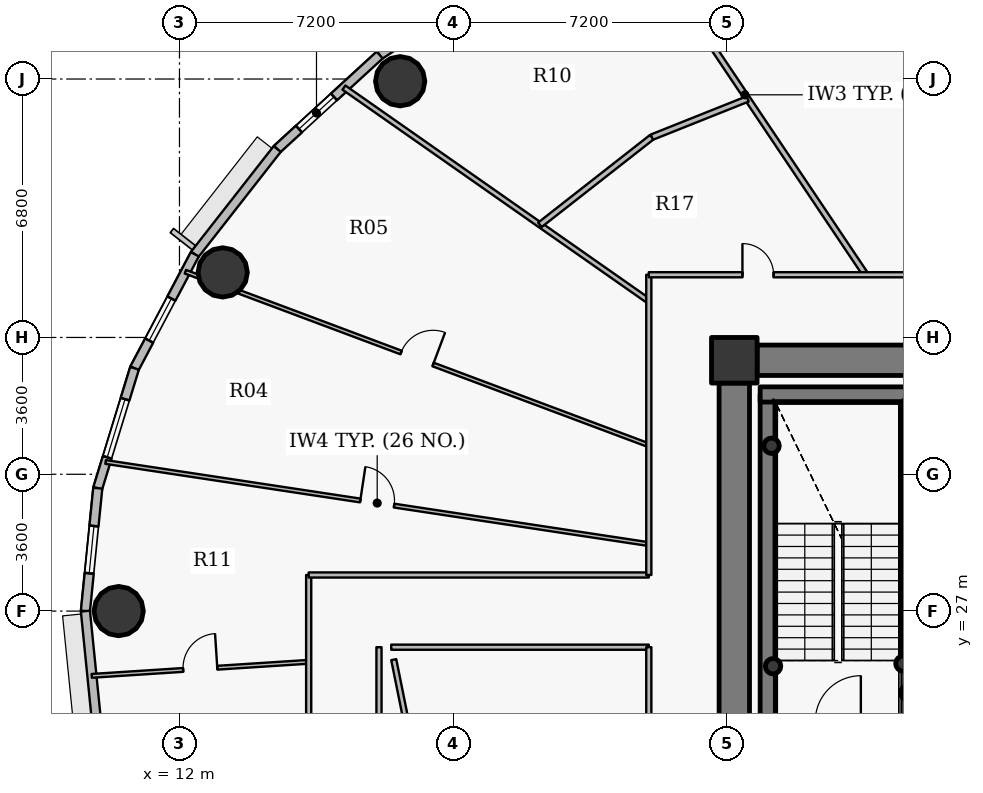
"""IFC4 building model, lengths in metres.
Left out: names, types, materials, properties, quantities, classifications, styles, units other than length and angle.
Written with IfcOpenShell. Run it as: python <this file> out.ifc"""

import sys

from ifc_helpers import new_model, si_unit, direction, frame, frame_2d, origin, origin_2d, place, context, subcontext, project, spatial, rectangle, hollow_circle, extrude, source, transform, mapped, element, fill, save


model = new_model("IFC4")
c1 = context("Model", 3, precision=1e-05, world=origin(), true_north=direction((0.0, 1.0)))
c2 = subcontext(c1, "Body", "Model", "MODEL_VIEW")
j1 = project(units=[si_unit("LENGTHUNIT", "METRE"), si_unit("PLANEANGLEUNIT", "RADIAN")], contexts=[c1])
p1 = place(None, origin())
s1 = spatial("IfcSite", under=j1, at=p1, CompositionType="ELEMENT")
p2 = place(p1, origin())
s2 = spatial("IfcBuilding", under=s1, at=p2, CompositionType="ELEMENT")
p3 = place(p2, frame((0.0, 0.0, 167.4)))
s3 = spatial("IfcBuildingStorey", under=s2, at=p3, CompositionType="ELEMENT", Elevation=167.4)
p4 = place(p3, frame((26.6, 33.6, 0.0), z_axis=(0.0, 0.0, 1.0), x_axis=(1.0, 0.0, 0.0)))
e1 = element("IfcColumn", 1, at=p4, inside=s3, PredefinedType="COLUMN", context=c2, shape_type="SweptSolid", body=[
    extrude(rectangle(XDim=1.2, YDim=1.2, at=origin_2d()), origin(), (0.0, 0.0, 1.0), 3.75),
])
p5 = place(p3, frame((27.48, 24.1, 0.0), z_axis=(0.0, 0.0, 1.0), x_axis=(0.0, 1.0, 0.0)))
e2 = element("IfcWall", 2, at=p5, inside=s3, PredefinedType="SHEAR", context=c2, shape_type="SweptSolid", body=[
    extrude(rectangle(XDim=8.6, YDim=0.4, at=frame_2d((4.3, 0.0))), origin(), (0.0, 0.0, 1.0), 3.75),
])
p6 = place(p3, frame((31.18, 27.8, 0.0), z_axis=(0.0, 0.0, 1.0), x_axis=(0.0, 1.0, 0.0)))
e3 = element("IfcWall", 3, at=p6, inside=s3, PredefinedType="SHEAR", context=c2, shape_type="SweptSolid", body=[
    extrude(rectangle(XDim=4.9, YDim=0.4, at=frame_2d((2.45, 0.0))), origin(), (0.0, 0.0, 1.0), 3.75),
])
p7 = place(p3, frame((27.28, 32.7, 0.0), z_axis=(0.0, 0.0, 1.0), x_axis=(1.0, 0.0, 0.0)))
e4 = element("IfcWall", 4, at=p7, inside=s3, PredefinedType="SHEAR", context=c2, shape_type="SweptSolid", body=[
    extrude(rectangle(XDim=4.1, YDim=0.4, at=frame_2d((2.05, 0.0))), origin(), (0.0, 0.0, 1.0), 3.75),
])
for number, where, z_axis, x_axis in (
    (5, (27.58, 31.35, 0.0), (0.0, 0.0, 1.0), (1.0, 0.0, 0.0)),
    (6, (31.05, 25.62, 0.0), (0.0, 0.0, 1.0), (1.0, 0.0, 0.0)),
    (7, (31.18, 24.85, 0.0), (0.0, 0.0, 1.0), (1.0, 0.0, 0.0)),
    (8, (27.62, 25.55, 0.0), (0.0, 0.0, 1.0), (1.0, 0.0, 0.0)),
):
    element("IfcColumn", number, at=place(p3, frame(where, z_axis=z_axis, x_axis=x_axis)), inside=s3, PredefinedType="COLUMN", context=c2, shape_type="SweptSolid", body=[
        extrude(hollow_circle(Radius=0.203, WallThickness=0.016, at=origin_2d()), origin(), (0.0, 0.0, 1.0), 3.75),
    ])
p8 = place(p3, frame((27.2, 33.6, 0.0), z_axis=(0.0, 0.0, 1.0), x_axis=(1.0, 0.0, 0.0)))
e9 = element("IfcWall", 9, at=p8, inside=s3, PredefinedType="SHEAR", context=c2, shape_type="SweptSolid", body=[
    extrude(rectangle(XDim=17.6, YDim=0.8, at=frame_2d((8.8, 0.0))), origin(), (0.0, 0.0, 1.0), 2.95),
])
p9 = place(p8, frame((13.45, 0.0, 0.0)))
e10 = element("IfcOpeningElement", 10, at=p9, cuts=e9, PredefinedType="OPENING", context=c2, shape_type="SweptSolid", body=[
    extrude(rectangle(XDim=1.15, YDim=2.15, at=origin_2d()), frame((0.575, 0.41, 1.075), z_axis=(0.0, -1.0, 0.0), x_axis=(1.0, 0.0, 0.0)), (0.0, 0.0, 1.0), 0.82),
])
p10 = place(p3, frame((26.6, 21.0, 0.0), z_axis=(0.0, 0.0, 1.0), x_axis=(0.0, 1.0, 0.0)))
e11 = element("IfcWall", 11, at=p10, inside=s3, PredefinedType="SHEAR", context=c2, shape_type="SweptSolid", body=[
    extrude(rectangle(XDim=12.0, YDim=0.8, at=frame_2d((6.0, 0.0))), origin(), (0.0, 0.0, 1.0), 2.95),
])
p11 = place(p10, frame((1.061, 0.0, 0.0)))
e12 = element("IfcOpeningElement", 12, at=p11, cuts=e11, PredefinedType="OPENING", context=c2, shape_type="SweptSolid", body=[
    extrude(rectangle(XDim=1.15, YDim=2.15, at=origin_2d()), frame((0.575, 0.41, 1.075), z_axis=(0.0, -1.0, 0.0), x_axis=(1.0, 0.0, 0.0)), (0.0, 0.0, 1.0), 0.82),
])
p12 = place(p3, frame((31.18, 25.55, 0.0), z_axis=(0.0, 0.0, 1.0), x_axis=(0.0, 1.0, 0.0)))
e13 = element("IfcWall", 13, at=p12, inside=s3, PredefinedType="SHEAR", context=c2, shape_type="SweptSolid", body=[
    extrude(rectangle(XDim=2.25, YDim=0.4, at=frame_2d((1.125, 0.0))), origin(), (0.0, 0.0, 1.0), 3.1),
])
for number, where, z_axis, x_axis in (
    (14, (17.808, 40.942, 0.0), (0.0, 0.0, 1.0), (1.0, 0.0, 0.0)),
    (15, (13.137, 35.911, 0.0), (0.0, 0.0, 1.0), (1.0, 0.0, 0.0)),
    (16, (10.4, 27.0, 0.0), (0.0, 0.0, 1.0), (1.0, 0.0, 0.0)),
):
    element("IfcColumn", number, at=place(p3, frame(where, z_axis=z_axis, x_axis=x_axis)), inside=s3, PredefinedType="COLUMN", context=c2, shape_type="SweptSolid", body=[
        extrude(hollow_circle(Radius=0.65, WallThickness=0.04, at=origin_2d()), origin(), (0.0, 0.0, 1.0), 3.75),
    ])
p13 = place(p3, frame((17.268, 41.631, 0.0), z_axis=(0.0, 0.0, 1.0), x_axis=(0.831228998277, 0.555930168657, 0.0)))
e17 = element("IfcWall", 17, at=p13, inside=s3, PredefinedType="SOLIDWALL", context=c2, shape_type="SweptSolid", body=[
    extrude(rectangle(XDim=3.8, YDim=0.24, at=frame_2d((1.9, 0.0))), origin(), (0.0, 0.0, 1.0), 3.5),
])
p14 = place(p3, frame((14.572, 39.158, 0.0), z_axis=(0.0, 0.0, 1.0), x_axis=(0.737076565834, 0.675809245349, 0.0)))
e18 = element("IfcWall", 18, at=p14, inside=s3, PredefinedType="SOLIDWALL", context=c2, shape_type="SweptSolid", body=[
    extrude(rectangle(XDim=3.658, YDim=0.24, at=frame_2d((1.829, 0.0))), origin(), (0.0, 0.0, 1.0), 3.5),
])
p15 = place(p14, frame((0.778, 0.0, 0.9)))
e19 = element("IfcOpeningElement", 19, at=p15, cuts=e18, PredefinedType="OPENING", context=c2, shape_type="SweptSolid", body=[
    extrude(rectangle(XDim=1.25, YDim=1.65, at=origin_2d()), frame((0.625, 0.13, 0.825), z_axis=(0.0, -1.0, 0.0), x_axis=(1.0, 0.0, 0.0)), (0.0, 0.0, 1.0), 0.26),
])
p16 = place(p3, frame((12.404, 36.388, 0.0), z_axis=(0.0, 0.0, 1.0), x_axis=(0.616287674549, 0.787521112224, 0.0)))
e20 = element("IfcWall", 20, at=p16, inside=s3, PredefinedType="SOLIDWALL", context=c2, shape_type="SweptSolid", body=[
    extrude(rectangle(XDim=3.517, YDim=0.24, at=frame_2d((1.759, 0.0))), origin(), (0.0, 0.0, 1.0), 3.5),
])
p17 = place(p3, frame((10.817, 33.389, 0.0), z_axis=(0.0, 0.0, 1.0), x_axis=(0.467586874938, 0.88394712194, 0.0)))
e21 = element("IfcWall", 21, at=p17, inside=s3, PredefinedType="SOLIDWALL", context=c2, shape_type="SweptSolid", body=[
    extrude(rectangle(XDim=3.393, YDim=0.24, at=frame_2d((1.697, 0.0))), origin(), (0.0, 0.0, 1.0), 3.5),
])
p18 = place(p17, frame((0.825, 0.0, 0.9)))
e22 = element("IfcOpeningElement", 22, at=p18, cuts=e21, PredefinedType="OPENING", context=c2, shape_type="SweptSolid", body=[
    extrude(rectangle(XDim=1.25, YDim=1.65, at=origin_2d()), frame((0.625, 0.13, 0.825), z_axis=(0.0, -1.0, 0.0), x_axis=(1.0, 0.0, 0.0)), (0.0, 0.0, 1.0), 0.26),
])
p19 = place(p3, frame((9.85, 30.234, 0.0), z_axis=(0.0, 0.0, 1.0), x_axis=(0.293097995113, 0.956082405058, 0.0)))
e23 = element("IfcWall", 23, at=p19, inside=s3, PredefinedType="SOLIDWALL", context=c2, shape_type="SweptSolid", body=[
    extrude(rectangle(XDim=3.3, YDim=0.24, at=frame_2d((1.65, 0.0))), origin(), (0.0, 0.0, 1.0), 3.5),
])
p20 = place(p19, frame((0.85, 0.0, 0.9)))
e24 = element("IfcOpeningElement", 24, at=p20, cuts=e23, PredefinedType="OPENING", context=c2, shape_type="SweptSolid", body=[
    extrude(rectangle(XDim=1.6, YDim=1.75, at=origin_2d()), frame((0.8, 0.13, 0.875), z_axis=(0.0, -1.0, 0.0), x_axis=(1.0, 0.0, 0.0)), (0.0, 0.0, 1.0), 0.26),
])
p21 = place(p3, frame((9.525, 27.0, 0.0), z_axis=(0.0, 0.0, 1.0), x_axis=(0.100061534614, 0.994981250723, 0.0)))
e25 = element("IfcWall", 25, at=p21, inside=s3, PredefinedType="SOLIDWALL", context=c2, shape_type="SweptSolid", body=[
    extrude(rectangle(XDim=3.25, YDim=0.24, at=frame_2d((1.625, 0.0))), origin(), (0.0, 0.0, 1.0), 3.5),
])
p22 = place(p21, frame((1.0, 0.0, 0.9)))
e26 = element("IfcOpeningElement", 26, at=p22, cuts=e25, PredefinedType="OPENING", context=c2, shape_type="SweptSolid", body=[
    extrude(rectangle(XDim=1.25, YDim=1.65, at=origin_2d()), frame((0.625, 0.13, 0.825), z_axis=(0.0, -1.0, 0.0), x_axis=(1.0, 0.0, 0.0)), (0.0, 0.0, 1.0), 0.26),
])
p23 = place(p3, frame((9.85, 23.766, 0.0), z_axis=(0.0, 0.0, 1.0), x_axis=(-0.100061534614, 0.994981250723, 0.0)))
e27 = element("IfcWall", 27, at=p23, inside=s3, PredefinedType="SOLIDWALL", context=c2, shape_type="SweptSolid", body=[
    extrude(rectangle(XDim=3.25, YDim=0.24, at=frame_2d((1.625, 0.0))), origin(), (0.0, 0.0, 1.0), 3.5),
])
p24 = place(p3, frame((9.691, 25.296, 0.0), z_axis=(0.0, 0.0, 1.0), x_axis=(0.99791042292, 0.064612598054, 0.0)))
e28 = element("IfcWall", 28, at=p24, inside=s3, PredefinedType="PARTITIONING", context=c2, shape_type="SweptSolid", body=[
    extrude(rectangle(XDim=5.721, YDim=0.1, at=frame_2d((2.86, 0.0))), origin(), (0.0, 0.0, 1.0), 2.935),
])
p25 = place(p24, frame((2.41, 0.0, 0.0)))
e29 = element("IfcOpeningElement", 29, at=p25, cuts=e28, PredefinedType="OPENING", context=c2, shape_type="SweptSolid", body=[
    extrude(rectangle(XDim=0.9, YDim=2.1, at=origin_2d()), frame((0.45, 0.06, 1.05), z_axis=(0.0, -1.0, 0.0), x_axis=(1.0, 0.0, 0.0)), (0.0, 0.0, 1.0), 0.12),
])
p26 = place(p3, frame((10.056, 30.924, 0.0), z_axis=(0.0, 0.0, 1.0), x_axis=(0.988757382987, -0.149528718277, 0.0)))
e30 = element("IfcWall", 30, at=p26, inside=s3, PredefinedType="PARTITIONING", context=c2, shape_type="SweptSolid", body=[
    extrude(rectangle(XDim=14.456, YDim=0.1, at=frame_2d((7.228, 0.0))), origin(), (0.0, 0.0, 1.0), 2.935),
])
p27 = place(p26, frame((6.778, 0.0, 0.0)))
e31 = element("IfcOpeningElement", 31, at=p27, cuts=e30, PredefinedType="OPENING", context=c2, shape_type="SweptSolid", body=[
    extrude(rectangle(XDim=0.9, YDim=2.1, at=origin_2d()), frame((0.45, 0.06, 1.05), z_axis=(0.0, -1.0, 0.0), x_axis=(1.0, 0.0, 0.0)), (0.0, 0.0, 1.0), 0.12),
])
p28 = place(p3, frame((12.156, 35.93, 0.0), z_axis=(0.0, 0.0, 1.0), x_axis=(0.936480111121, -0.350720688689, 0.0)))
e32 = element("IfcWall", 32, at=p28, inside=s3, PredefinedType="PARTITIONING", context=c2, shape_type="SweptSolid", body=[
    extrude(rectangle(XDim=13.021, YDim=0.1, at=frame_2d((6.511, 0.0))), origin(), (0.0, 0.0, 1.0), 2.935),
])
p29 = place(p28, frame((6.061, 0.0, 0.0)))
e33 = element("IfcOpeningElement", 33, at=p29, cuts=e32, PredefinedType="OPENING", context=c2, shape_type="SweptSolid", body=[
    extrude(rectangle(XDim=0.9, YDim=2.1, at=origin_2d()), frame((0.45, 0.06, 1.05), z_axis=(0.0, -1.0, 0.0), x_axis=(1.0, 0.0, 0.0)), (0.0, 0.0, 1.0), 0.12),
])
p30 = place(p3, frame((15.4, 23.146, 0.0), z_axis=(0.0, 0.0, 1.0), x_axis=(0.0, 1.0, 0.0)))
e34 = element("IfcWall", 34, at=p30, inside=s3, PredefinedType="PARTITIONING", context=c2, shape_type="SweptSolid", body=[
    extrude(rectangle(XDim=4.804, YDim=0.135, at=frame_2d((2.402, 0.0))), origin(), (0.0, 0.0, 1.0), 2.935),
])
p31 = place(p3, frame((15.4, 27.95, 0.0), z_axis=(0.0, 0.0, 1.0), x_axis=(1.0, 0.0, 0.0)))
e35 = element("IfcWall", 35, at=p31, inside=s3, PredefinedType="PARTITIONING", context=c2, shape_type="SweptSolid", body=[
    extrude(rectangle(XDim=8.95, YDim=0.135, at=frame_2d((4.475, 0.0))), origin(), (0.0, 0.0, 1.0), 3.5),
])
p32 = place(p3, frame((16.327, 40.775, 0.0), z_axis=(0.0, 0.0, 1.0), x_axis=(0.819149932575, -0.573579452179, 0.0)))
e36 = element("IfcWall", 36, at=p32, inside=s3, PredefinedType="PARTITIONING", context=c2, shape_type="SweptSolid", body=[
    extrude(rectangle(XDim=9.794, YDim=0.135, at=frame_2d((4.897, 0.0))), origin(), (0.0, 0.0, 1.0), 2.935),
])
p33 = place(p3, frame((17.572, 26.05, 0.0), z_axis=(0.0, 0.0, 1.0), x_axis=(1.0, 0.0, 0.0)))
e37 = element("IfcWall", 37, at=p33, inside=s3, PredefinedType="PARTITIONING", context=c2, shape_type="SweptSolid", body=[
    extrude(rectangle(XDim=6.778, YDim=0.135, at=frame_2d((3.389, 0.0))), origin(), (0.0, 0.0, 1.0), 3.5),
])
p34 = place(p3, frame((21.485, 37.164, 0.0), z_axis=(0.0, 0.0, 1.0), x_axis=(0.787295634213, 0.616575692311, 0.0)))
e38 = element("IfcWall", 38, at=p34, inside=s3, PredefinedType="PARTITIONING", context=c2, shape_type="SweptSolid", body=[
    extrude(rectangle(XDim=3.741, YDim=0.15, at=frame_2d((1.871, 0.0))), origin(), (0.0, 0.0, 1.0), 2.935),
])
p35 = place(p3, frame((23.699, 45.319, 0.0), z_axis=(0.0, 0.0, 1.0), x_axis=(0.557458426319, -0.830204856, 0.0)))
e39 = element("IfcWall", 39, at=p35, inside=s3, PredefinedType="PARTITIONING", context=c2, shape_type="SweptSolid", body=[
    extrude(rectangle(XDim=11.406, YDim=0.15, at=frame_2d((5.703, 0.0))), origin(), (0.0, 0.0, 1.0), 2.935),
])
p36 = place(p35, frame((2.412, 0.0, 0.0)))
e40 = element("IfcOpeningElement", 40, at=p36, cuts=e39, PredefinedType="OPENING", context=c2, shape_type="SweptSolid", body=[
    extrude(rectangle(XDim=1.05, YDim=2.15, at=origin_2d()), frame((0.525, 0.085, 1.075), z_axis=(0.0, -1.0, 0.0), x_axis=(1.0, 0.0, 0.0)), (0.0, 0.0, 1.0), 0.17),
])
for number, where, z_axis, x_axis in (
    (41, (24.35, 18.15, 0.0), (0.0, 0.0, 1.0), (0.0, 1.0, 0.0)),
    (42, (24.35, 27.95, 0.0), (0.0, 0.0, 1.0), (0.0, 1.0, 0.0)),
):
    element("IfcWall", number, at=place(p3, frame(where, z_axis=z_axis, x_axis=x_axis)), inside=s3, PredefinedType="PARTITIONING", context=c2, shape_type="SweptSolid", body=[
        extrude(rectangle(XDim=7.9, YDim=0.135, at=frame_2d((3.95, 0.0))), origin(), (0.0, 0.0, 1.0), 2.935),
    ])
p37 = place(p3, frame((24.35, 35.85, 0.0), z_axis=(0.0, 0.0, 1.0), x_axis=(1.0, 0.0, 0.0)))
e43 = element("IfcWall", 43, at=p37, inside=s3, PredefinedType="PARTITIONING", context=c2, shape_type="SweptSolid", body=[
    extrude(rectangle(XDim=19.343, YDim=0.135, at=frame_2d((9.671, 0.0))), origin(), (0.0, 0.0, 1.0), 2.935),
])
p38 = place(p37, frame((11.98, 0.0, 0.0)))
e44 = element("IfcOpeningElement", 44, at=p38, cuts=e43, PredefinedType="OPENING", context=c2, shape_type="SweptSolid", body=[
    extrude(rectangle(XDim=1.05, YDim=2.15, at=origin_2d()), frame((0.525, 0.078, 1.075), z_axis=(0.0, -1.0, 0.0), x_axis=(1.0, 0.0, 0.0)), (0.0, 0.0, 1.0), 0.155),
])
p39 = place(p37, frame((2.464, 0.0, 0.0)))
e45 = element("IfcOpeningElement", 45, at=p39, cuts=e43, PredefinedType="OPENING", context=c2, shape_type="SweptSolid", body=[
    extrude(rectangle(XDim=0.82, YDim=2.1, at=origin_2d()), frame((0.41, 0.078, 1.05), z_axis=(0.0, -1.0, 0.0), x_axis=(1.0, 0.0, 0.0)), (0.0, 0.0, 1.0), 0.155),
])
p40 = place(p3, frame((24.43, 39.47, 0.0), z_axis=(0.0, 0.0, 1.0), x_axis=(0.928811262565, 0.370553152103, 0.0)))
e46 = element("IfcWall", 46, at=p40, inside=s3, PredefinedType="PARTITIONING", context=c2, shape_type="SweptSolid", body=[
    extrude(rectangle(XDim=2.715, YDim=0.15, at=frame_2d((1.357, 0.0))), origin(), (0.0, 0.0, 1.0), 3.5),
])
p41 = place(p3, frame((31.1, 24.1, 0.0), z_axis=(0.0, 0.0, 1.0), x_axis=(0.0, 1.0, 0.0)))
e47 = element("IfcWall", 47, at=p41, inside=s3, PredefinedType="PARTITIONING", context=c2, shape_type="SweptSolid", body=[
    extrude(rectangle(XDim=1.44, YDim=0.2, at=frame_2d((0.72, 0.0))), origin(), (0.0, 0.0, 1.0), 3.5),
])
p42 = place(p3, frame((17.25, 26.05, 0.0), z_axis=(0.0, 0.0, 1.0), x_axis=(0.0, -1.0, 0.0)))
e48 = element("IfcWall", 48, at=p42, inside=s3, PredefinedType="PARTITIONING", context=c2, shape_type="SweptSolid", body=[
    extrude(rectangle(XDim=5.06, YDim=0.135, at=frame_2d((2.53, 0.0))), origin(), (0.0, 0.0, 1.0), 2.935),
])
p43 = place(p3, frame((27.19, 34.0, 0.0), z_axis=(0.0, 0.0, 1.0), x_axis=(-1.0, 0.0, 0.0)))
e49 = element("IfcWall", 49, at=p43, inside=s3, PredefinedType="PARTITIONING", context=c2, shape_type="SweptSolid", body=[
    extrude(rectangle(XDim=0.99, YDim=0.135, at=frame_2d((0.495, 0.0))), origin(), (0.0, 0.0, 1.0), 2.935),
])
p44 = place(p3, frame((26.2, 33.692, 0.0), z_axis=(0.0, 0.0, 1.0), x_axis=(0.0, -1.0, 0.0)))
e50 = element("IfcWall", 50, at=p44, inside=s3, PredefinedType="PARTITIONING", context=c2, shape_type="SweptSolid", body=[
    extrude(rectangle(XDim=0.682, YDim=0.135, at=frame_2d((0.341, 0.0))), origin(), (0.0, 0.0, 1.0), 3.5),
])
p45 = place(p3, frame((18.291, 22.494, 0.0), z_axis=(0.0, 0.0, 1.0), x_axis=(-0.198211153628, 0.980159343463, 0.0)))
e51 = element("IfcWall", 51, at=p45, inside=s3, PredefinedType="PARTITIONING", context=c2, shape_type="SweptSolid", body=[
    extrude(rectangle(XDim=3.294, YDim=0.135, at=frame_2d((1.647, 0.0))), origin(), (0.0, 0.0, 1.0), 2.935),
])
m1 = source(origin(), c2, "Body", "SweptSolid", [
    extrude(rectangle(XDim=1.25, YDim=1.65, at=origin_2d()), frame((0.625, 0.03, 0.825), z_axis=(0.0, -1.0, 0.0), x_axis=(1.0, 0.0, 0.0)), (0.0, 0.0, 1.0), 0.06),
])
p46 = place(p15, origin())
e52 = element("IfcWindow", 52, at=p46, inside=s3, PartitioningType="SINGLE_PANEL", PredefinedType="WINDOW", context=c2, shape_type="MappedRepresentation", body=[
    mapped(m1, transform((0.0, 0.0, 0.0), x_axis=(1.0, 0.0, 0.0), y_axis=(0.0, 1.0, 0.0), z_axis=(0.0, 0.0, 1.0), scale=1.0)),
])
fill(e19, e52)
p47 = place(p18, origin())
e53 = element("IfcWindow", 53, at=p47, inside=s3, PartitioningType="SINGLE_PANEL", PredefinedType="WINDOW", context=c2, shape_type="MappedRepresentation", body=[
    mapped(m1, transform((0.0, 0.0, 0.0), x_axis=(1.0, 0.0, 0.0), y_axis=(0.0, 1.0, 0.0), z_axis=(0.0, 0.0, 1.0), scale=1.0)),
])
fill(e22, e53)
m2 = source(origin(), c2, "Body", "SweptSolid", [
    extrude(rectangle(XDim=1.6, YDim=1.75, at=origin_2d()), frame((0.8, 0.03, 0.875), z_axis=(0.0, -1.0, 0.0), x_axis=(1.0, 0.0, 0.0)), (0.0, 0.0, 1.0), 0.06),
])
p48 = place(p20, origin())
e54 = element("IfcWindow", 54, at=p48, inside=s3, PartitioningType="DOUBLE_PANEL_VERTICAL", PredefinedType="WINDOW", context=c2, shape_type="MappedRepresentation", body=[
    mapped(m2, transform((0.0, 0.0, 0.0), x_axis=(1.0, 0.0, 0.0), y_axis=(0.0, 1.0, 0.0), z_axis=(0.0, 0.0, 1.0), scale=1.0)),
])
fill(e24, e54)
p49 = place(p22, origin())
e55 = element("IfcWindow", 55, at=p49, inside=s3, PartitioningType="SINGLE_PANEL", PredefinedType="WINDOW", context=c2, shape_type="MappedRepresentation", body=[
    mapped(m1, transform((0.0, 0.0, 0.0), x_axis=(1.0, 0.0, 0.0), y_axis=(0.0, 1.0, 0.0), z_axis=(0.0, 0.0, 1.0), scale=1.0)),
])
fill(e26, e55)
m3 = source(origin(), c2, "Body", "SweptSolid", [
    extrude(rectangle(XDim=0.9, YDim=2.1, at=origin_2d()), frame((0.45, 0.025, 1.05), z_axis=(0.0, -1.0, 0.0), x_axis=(1.0, 0.0, 0.0)), (0.0, 0.0, 1.0), 0.05),
])
p50 = place(p25, origin())
e56 = element("IfcDoor", 56, at=p50, inside=s3, OperationType="SINGLE_SWING_RIGHT", PredefinedType="DOOR", context=c2, shape_type="MappedRepresentation", body=[
    mapped(m3, transform((0.0, 0.0, 0.0), x_axis=(1.0, 0.0, 0.0), y_axis=(0.0, 1.0, 0.0), z_axis=(0.0, 0.0, 1.0), scale=1.0)),
])
fill(e29, e56)
p51 = place(p27, origin())
e57 = element("IfcDoor", 57, at=p51, inside=s3, OperationType="SINGLE_SWING_LEFT", PredefinedType="DOOR", context=c2, shape_type="MappedRepresentation", body=[
    mapped(m3, transform((0.0, 0.0, 0.0), x_axis=(1.0, 0.0, 0.0), y_axis=(0.0, 1.0, 0.0), z_axis=(0.0, 0.0, 1.0), scale=1.0)),
])
fill(e31, e57)
p52 = place(p29, origin())
e58 = element("IfcDoor", 58, at=p52, inside=s3, OperationType="SINGLE_SWING_RIGHT", PredefinedType="DOOR", context=c2, shape_type="MappedRepresentation", body=[
    mapped(m3, transform((0.0, 0.0, 0.0), x_axis=(1.0, 0.0, 0.0), y_axis=(0.0, 1.0, 0.0), z_axis=(0.0, 0.0, 1.0), scale=1.0)),
])
fill(e33, e58)
m4 = source(origin(), c2, "Body", "SweptSolid", [
    extrude(rectangle(XDim=0.82, YDim=2.1, at=origin_2d()), frame((0.41, 0.025, 1.05), z_axis=(0.0, -1.0, 0.0), x_axis=(1.0, 0.0, 0.0)), (0.0, 0.0, 1.0), 0.05),
])
p53 = place(p39, origin())
e59 = element("IfcDoor", 59, at=p53, inside=s3, OperationType="SINGLE_SWING_LEFT", PredefinedType="DOOR", context=c2, shape_type="MappedRepresentation", body=[
    mapped(m4, transform((0.0, 0.0, 0.0), x_axis=(1.0, 0.0, 0.0), y_axis=(0.0, 1.0, 0.0), z_axis=(0.0, 0.0, 1.0), scale=1.0)),
])
fill(e45, e59)
save(model, sys.argv[1])
